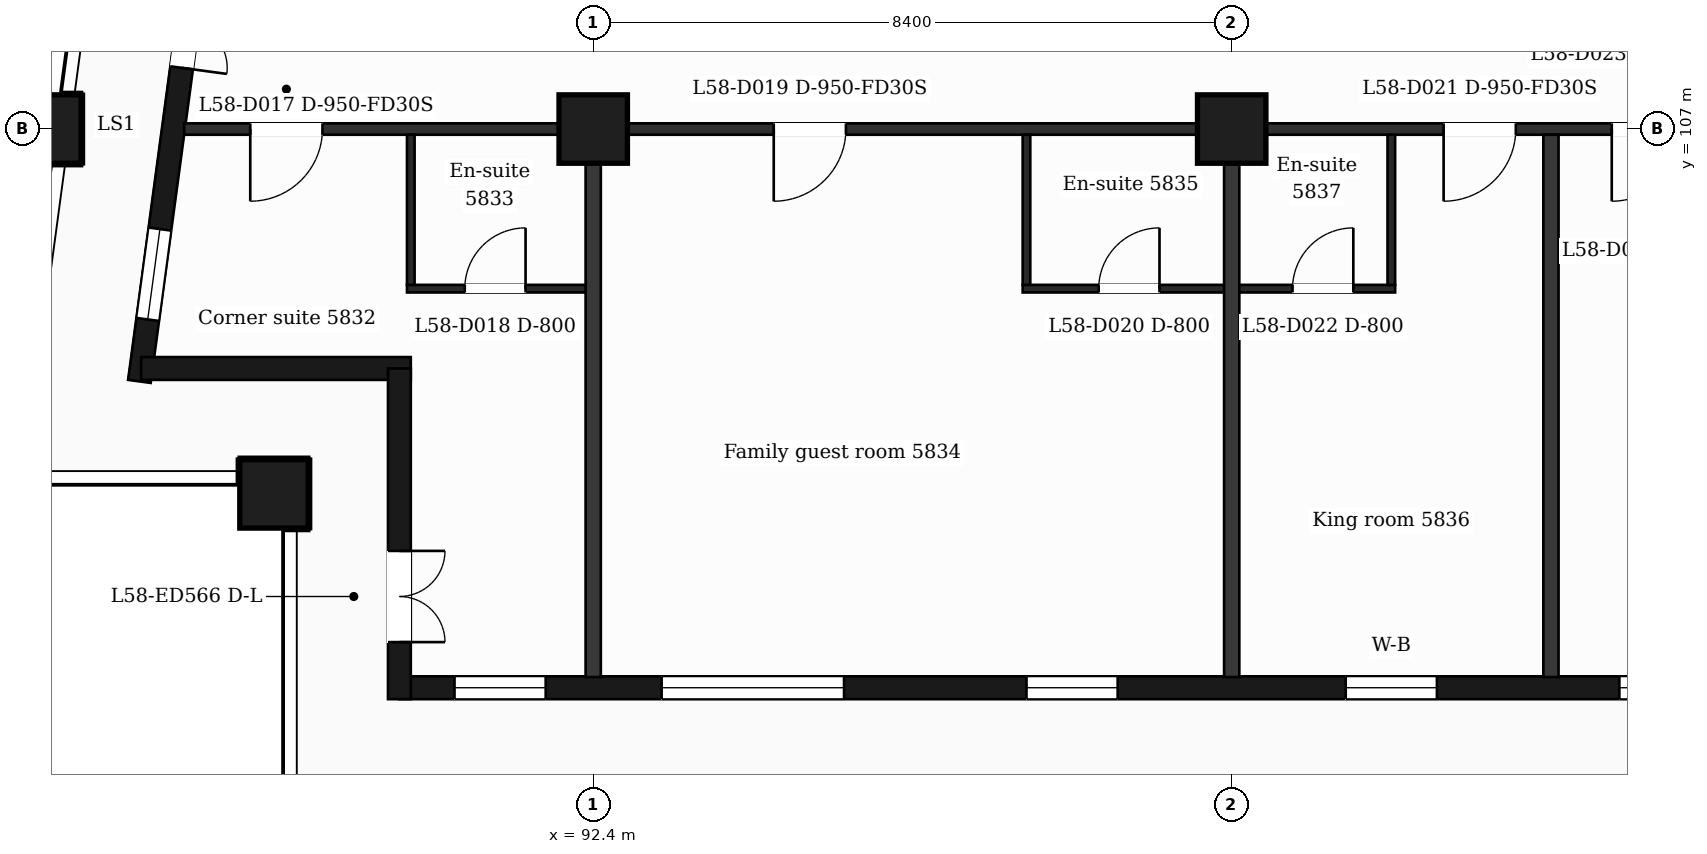
"""IFC4 building model, lengths in metres.
Left out: names, types, materials, properties, quantities, classifications, styles, units other than length and angle.
Written with IfcOpenShell. Run it as: python <this file> out.ifc"""

import sys

from ifc_helpers import new_model, si_unit, direction, frame, frame_2d, origin, origin_2d, place, context, subcontext, project, spatial, rectangle, extrude, element, fill, save


model = new_model("IFC4")
c1 = context("Model", 3, precision=1e-05, world=origin(), true_north=direction((0.0, 1.0)))
c2 = subcontext(c1, "Body", "Model", "MODEL_VIEW")
j1 = project(units=[si_unit("LENGTHUNIT", "METRE"), si_unit("PLANEANGLEUNIT", "RADIAN")], contexts=[c1])
p1 = place(None, origin())
s1 = spatial("IfcSite", under=j1, at=p1, CompositionType="ELEMENT")
p2 = place(p1, origin())
s2 = spatial("IfcBuilding", under=s1, at=p2, CompositionType="ELEMENT")
p3 = place(p2, frame((0.0, 0.0, 239.2)))
s3 = spatial("IfcBuildingStorey", under=s2, at=p3, CompositionType="ELEMENT", Elevation=239.2)
for number, where, z_axis, x_axis in (
    (1, (88.2, 102.2, 0.0), (0.0, 0.0, 1.0), (1.0, 0.0, 0.0)),
    (2, (92.4, 107.0, 0.0), (0.0, 0.0, 1.0), (1.0, 0.0, 0.0)),
    (3, (100.8, 107.0, 0.0), (0.0, 0.0, 1.0), (1.0, 0.0, 0.0)),
    (4, (85.211, 107.0, 0.0), (0.0, 0.0, 1.0), (1.0, 0.0, 0.0)),
):
    element("IfcColumn", number, at=place(p3, frame(where, z_axis=z_axis, x_axis=x_axis)), inside=s3, PredefinedType="COLUMN", context=c2, shape_type="SweptSolid", body=[
        extrude(rectangle(XDim=0.9, YDim=0.9, at=origin_2d()), origin(), (0.0, 0.0, 1.0), 3.7),
    ])
p4 = place(p3, frame((89.85, 99.65, 0.0), z_axis=(0.0, 0.0, 1.0), x_axis=(1.0, 0.0, 0.0)))
e5 = element("IfcWall", 5, at=p4, inside=s3, PredefinedType="SOLIDWALL", context=c2, shape_type="SweptSolid", body=[
    extrude(rectangle(XDim=47.25, YDim=0.3, at=frame_2d((23.625, 0.0))), origin(), (0.0, 0.0, 1.0), 3.38),
])
p5 = place(p4, frame((0.725, 0.0, 0.9)))
e6 = element("IfcOpeningElement", 6, at=p5, cuts=e5, PredefinedType="OPENING", context=c2, shape_type="SweptSolid", body=[
    extrude(rectangle(XDim=1.2, YDim=2.1, at=frame_2d((0.6, 1.05))), frame((0.0, 0.16, 0.0), z_axis=(0.0, -1.0, 0.0), x_axis=(1.0, 0.0, 0.0)), (0.0, 0.0, 1.0), 0.32),
])
p6 = place(p4, frame((3.45, 0.0, 0.9)))
e7 = element("IfcOpeningElement", 7, at=p6, cuts=e5, PredefinedType="OPENING", context=c2, shape_type="SweptSolid", body=[
    extrude(rectangle(XDim=2.4, YDim=2.1, at=frame_2d((1.2, 1.05))), frame((0.0, 0.16, 0.0), z_axis=(0.0, -1.0, 0.0), x_axis=(1.0, 0.0, 0.0)), (0.0, 0.0, 1.0), 0.32),
])
p7 = place(p4, frame((8.25, 0.0, 0.9)))
e8 = element("IfcOpeningElement", 8, at=p7, cuts=e5, PredefinedType="OPENING", context=c2, shape_type="SweptSolid", body=[
    extrude(rectangle(XDim=1.2, YDim=2.1, at=frame_2d((0.6, 1.05))), frame((0.0, 0.16, 0.0), z_axis=(0.0, -1.0, 0.0), x_axis=(1.0, 0.0, 0.0)), (0.0, 0.0, 1.0), 0.32),
])
p8 = place(p4, frame((12.45, 0.0, 0.9)))
e9 = element("IfcOpeningElement", 9, at=p8, cuts=e5, PredefinedType="OPENING", context=c2, shape_type="SweptSolid", body=[
    extrude(rectangle(XDim=1.2, YDim=2.1, at=frame_2d((0.6, 1.05))), frame((0.0, 0.16, 0.0), z_axis=(0.0, -1.0, 0.0), x_axis=(1.0, 0.0, 0.0)), (0.0, 0.0, 1.0), 0.32),
])
p9 = place(p4, frame((16.05, 0.0, 0.9)))
e10 = element("IfcOpeningElement", 10, at=p9, cuts=e5, PredefinedType="OPENING", context=c2, shape_type="SweptSolid", body=[
    extrude(rectangle(XDim=2.4, YDim=2.1, at=frame_2d((1.2, 1.05))), frame((0.0, 0.16, 0.0), z_axis=(0.0, -1.0, 0.0), x_axis=(1.0, 0.0, 0.0)), (0.0, 0.0, 1.0), 0.32),
])
p10 = place(p4, frame((20.25, 0.0, 0.9)))
e11 = element("IfcOpeningElement", 11, at=p10, cuts=e5, PredefinedType="OPENING", context=c2, shape_type="SweptSolid", body=[
    extrude(rectangle(XDim=2.4, YDim=2.1, at=frame_2d((1.2, 1.05))), frame((0.0, 0.16, 0.0), z_axis=(0.0, -1.0, 0.0), x_axis=(1.0, 0.0, 0.0)), (0.0, 0.0, 1.0), 0.32),
])
p11 = place(p4, frame((25.05, 0.0, 0.0)))
e12 = element("IfcOpeningElement", 12, at=p11, cuts=e5, PredefinedType="OPENING", context=c2, shape_type="SweptSolid", body=[
    extrude(rectangle(XDim=1.2, YDim=2.4, at=frame_2d((0.6, 1.2))), frame((0.0, 0.16, 0.0), z_axis=(0.0, -1.0, 0.0), x_axis=(1.0, 0.0, 0.0)), (0.0, 0.0, 1.0), 0.32),
])
p12 = place(p4, frame((28.65, 0.0, 0.9)))
e13 = element("IfcOpeningElement", 13, at=p12, cuts=e5, PredefinedType="OPENING", context=c2, shape_type="SweptSolid", body=[
    extrude(rectangle(XDim=2.4, YDim=2.1, at=frame_2d((1.2, 1.05))), frame((0.0, 0.16, 0.0), z_axis=(0.0, -1.0, 0.0), x_axis=(1.0, 0.0, 0.0)), (0.0, 0.0, 1.0), 0.32),
])
p13 = place(p4, frame((32.85, 0.0, 0.9)))
e14 = element("IfcOpeningElement", 14, at=p13, cuts=e5, PredefinedType="OPENING", context=c2, shape_type="SweptSolid", body=[
    extrude(rectangle(XDim=2.4, YDim=2.1, at=frame_2d((1.2, 1.05))), frame((0.0, 0.16, 0.0), z_axis=(0.0, -1.0, 0.0), x_axis=(1.0, 0.0, 0.0)), (0.0, 0.0, 1.0), 0.32),
])
p14 = place(p4, frame((37.65, 0.0, 0.9)))
e15 = element("IfcOpeningElement", 15, at=p14, cuts=e5, PredefinedType="OPENING", context=c2, shape_type="SweptSolid", body=[
    extrude(rectangle(XDim=1.2, YDim=2.1, at=frame_2d((0.6, 1.05))), frame((0.0, 0.16, 0.0), z_axis=(0.0, -1.0, 0.0), x_axis=(1.0, 0.0, 0.0)), (0.0, 0.0, 1.0), 0.32),
])
p15 = place(p4, frame((41.85, 0.0, 0.9)))
e16 = element("IfcOpeningElement", 16, at=p15, cuts=e5, PredefinedType="OPENING", context=c2, shape_type="SweptSolid", body=[
    extrude(rectangle(XDim=1.2, YDim=2.1, at=frame_2d((0.6, 1.05))), frame((0.0, 0.16, 0.0), z_axis=(0.0, -1.0, 0.0), x_axis=(1.0, 0.0, 0.0)), (0.0, 0.0, 1.0), 0.32),
])
p16 = place(p4, frame((45.25, 0.0, 0.9)))
e17 = element("IfcOpeningElement", 17, at=p16, cuts=e5, PredefinedType="OPENING", context=c2, shape_type="SweptSolid", body=[
    extrude(rectangle(XDim=1.2, YDim=2.1, at=frame_2d((0.6, 1.05))), frame((0.0, 0.16, 0.0), z_axis=(0.0, -1.0, 0.0), x_axis=(1.0, 0.0, 0.0)), (0.0, 0.0, 1.0), 0.32),
])
p17 = place(p3, frame((87.334, 110.4, 0.0), z_axis=(0.0, 0.0, 1.0), x_axis=(-0.133437175554, -0.991057273915, 0.0)))
e18 = element("IfcWall", 18, at=p17, inside=s3, PredefinedType="SOLIDWALL", context=c2, shape_type="SweptSolid", body=[
    extrude(rectangle(XDim=6.781, YDim=0.3, at=frame_2d((3.39, 0.0))), origin(), (0.0, 0.0, 1.0), 3.38),
])
p18 = place(p17, frame((1.418, 0.0, 0.0)))
e19 = element("IfcOpeningElement", 19, at=p18, cuts=e18, PredefinedType="OPENING", context=c2, shape_type="SweptSolid", body=[
    extrude(rectangle(XDim=1.2, YDim=2.4, at=frame_2d((0.6, 1.2))), frame((0.0, 0.16, 0.0), z_axis=(0.0, -1.0, 0.0), x_axis=(1.0, 0.0, 0.0)), (0.0, 0.0, 1.0), 0.32),
])
p19 = place(p17, frame((4.758, 0.0, 0.9)))
e20 = element("IfcOpeningElement", 20, at=p19, cuts=e18, PredefinedType="OPENING", context=c2, shape_type="SweptSolid", body=[
    extrude(rectangle(XDim=1.2, YDim=2.1, at=frame_2d((0.6, 1.05))), frame((0.0, 0.16, 0.0), z_axis=(0.0, -1.0, 0.0), x_axis=(1.0, 0.0, 0.0)), (0.0, 0.0, 1.0), 0.32),
])
p20 = place(p3, frame((86.452, 103.85, 0.0), z_axis=(0.0, 0.0, 1.0), x_axis=(1.0, 0.0, 0.0)))
e21 = element("IfcWall", 21, at=p20, inside=s3, PredefinedType="SOLIDWALL", context=c2, shape_type="SweptSolid", body=[
    extrude(rectangle(XDim=3.548, YDim=0.3, at=frame_2d((1.774, 0.0))), origin(), (0.0, 0.0, 1.0), 3.38),
])
p21 = place(p3, frame((89.85, 103.85, 0.0), z_axis=(0.0, 0.0, 1.0), x_axis=(0.0, -1.0, 0.0)))
e22 = element("IfcWall", 22, at=p21, inside=s3, PredefinedType="SOLIDWALL", context=c2, shape_type="SweptSolid", body=[
    extrude(rectangle(XDim=4.35, YDim=0.3, at=frame_2d((2.175, 0.0))), origin(), (0.0, 0.0, 1.0), 3.38),
])
p22 = place(p21, frame((2.4, 0.0, 0.0)))
e23 = element("IfcOpeningElement", 23, at=p22, cuts=e22, PredefinedType="OPENING", context=c2, shape_type="SweptSolid", body=[
    extrude(rectangle(XDim=1.2, YDim=2.4, at=frame_2d((0.6, 1.2))), frame((0.0, 0.16, 0.0), z_axis=(0.0, -1.0, 0.0), x_axis=(1.0, 0.0, 0.0)), (0.0, 0.0, 1.0), 0.32),
])
p23 = place(p3, frame((89.95, 104.9, 0.0), z_axis=(0.0, 0.0, 1.0), x_axis=(1.0, 0.0, 0.0)))
e24 = element("IfcWall", 24, at=p23, inside=s3, PredefinedType="PARTITIONING", context=c2, shape_type="SweptSolid", body=[
    extrude(rectangle(XDim=2.45, YDim=0.1, at=frame_2d((1.225, 0.0))), origin(), (0.0, 0.0, 1.0), 3.38),
])
p24 = place(p23, frame((0.76, 0.0, 0.0)))
e25 = element("IfcOpeningElement", 25, at=p24, cuts=e24, PredefinedType="OPENING", context=c2, shape_type="SweptSolid", body=[
    extrude(rectangle(XDim=0.8, YDim=2.1, at=frame_2d((0.4, 1.05))), frame((0.0, 0.06, 0.0), z_axis=(0.0, -1.0, 0.0), x_axis=(1.0, 0.0, 0.0)), (0.0, 0.0, 1.0), 0.12),
])
p25 = place(p3, frame((98.05, 104.9, 0.0), z_axis=(0.0, 0.0, 1.0), x_axis=(1.0, 0.0, 0.0)))
e26 = element("IfcWall", 26, at=p25, inside=s3, PredefinedType="PARTITIONING", context=c2, shape_type="SweptSolid", body=[
    extrude(rectangle(XDim=4.9, YDim=0.1, at=frame_2d((2.45, 0.0))), origin(), (0.0, 0.0, 1.0), 3.38),
])
p26 = place(p25, frame((1.0, 0.0, 0.0)))
e27 = element("IfcOpeningElement", 27, at=p26, cuts=e26, PredefinedType="OPENING", context=c2, shape_type="SweptSolid", body=[
    extrude(rectangle(XDim=0.8, YDim=2.1, at=frame_2d((0.4, 1.05))), frame((0.0, 0.06, 0.0), z_axis=(0.0, -1.0, 0.0), x_axis=(1.0, 0.0, 0.0)), (0.0, 0.0, 1.0), 0.12),
])
p27 = place(p25, frame((3.55, 0.0, 0.0)))
e28 = element("IfcOpeningElement", 28, at=p27, cuts=e26, PredefinedType="OPENING", context=c2, shape_type="SweptSolid", body=[
    extrude(rectangle(XDim=0.8, YDim=2.1, at=frame_2d((0.4, 1.05))), frame((0.0, 0.06, 0.0), z_axis=(0.0, -1.0, 0.0), x_axis=(1.0, 0.0, 0.0)), (0.0, 0.0, 1.0), 0.12),
])
p28 = place(p3, frame((87.018, 107.0, 0.0), z_axis=(0.0, 0.0, 1.0), x_axis=(1.0, 0.0, 0.0)))
e29 = element("IfcWall", 29, at=p28, inside=s3, PredefinedType="PARTITIONING", context=c2, shape_type="SweptSolid", body=[
    extrude(rectangle(XDim=52.765, YDim=0.15, at=frame_2d((26.382, 0.0))), origin(), (0.0, 0.0, 1.0), 3.38),
])
p29 = place(p28, frame((0.87, 0.0, 0.0)))
e30 = element("IfcOpeningElement", 30, at=p29, cuts=e29, PredefinedType="OPENING", context=c2, shape_type="SweptSolid", body=[
    extrude(rectangle(XDim=0.95, YDim=2.1, at=frame_2d((0.475, 1.05))), frame((0.0, 0.085, 0.0), z_axis=(0.0, -1.0, 0.0), x_axis=(1.0, 0.0, 0.0)), (0.0, 0.0, 1.0), 0.17),
])
p30 = place(p28, frame((7.757, 0.0, 0.0)))
e31 = element("IfcOpeningElement", 31, at=p30, cuts=e29, PredefinedType="OPENING", context=c2, shape_type="SweptSolid", body=[
    extrude(rectangle(XDim=0.95, YDim=2.1, at=frame_2d((0.475, 1.05))), frame((0.0, 0.085, 0.0), z_axis=(0.0, -1.0, 0.0), x_axis=(1.0, 0.0, 0.0)), (0.0, 0.0, 1.0), 0.17),
])
p31 = place(p28, frame((16.57, 0.0, 0.0)))
e32 = element("IfcOpeningElement", 32, at=p31, cuts=e29, PredefinedType="OPENING", context=c2, shape_type="SweptSolid", body=[
    extrude(rectangle(XDim=0.95, YDim=2.1, at=frame_2d((0.475, 1.05))), frame((0.0, 0.085, 0.0), z_axis=(0.0, -1.0, 0.0), x_axis=(1.0, 0.0, 0.0)), (0.0, 0.0, 1.0), 0.17),
])
p32 = place(p28, frame((18.782, 0.0, 0.0)))
e33 = element("IfcOpeningElement", 33, at=p32, cuts=e29, PredefinedType="OPENING", context=c2, shape_type="SweptSolid", body=[
    extrude(rectangle(XDim=0.95, YDim=2.1, at=frame_2d((0.475, 1.05))), frame((0.0, 0.085, 0.0), z_axis=(0.0, -1.0, 0.0), x_axis=(1.0, 0.0, 0.0)), (0.0, 0.0, 1.0), 0.17),
])
p33 = place(p28, frame((24.519, 0.0, 0.0)))
e34 = element("IfcOpeningElement", 34, at=p33, cuts=e29, PredefinedType="OPENING", context=c2, shape_type="SweptSolid", body=[
    extrude(rectangle(XDim=0.95, YDim=2.1, at=frame_2d((0.475, 1.05))), frame((0.0, 0.085, 0.0), z_axis=(0.0, -1.0, 0.0), x_axis=(1.0, 0.0, 0.0)), (0.0, 0.0, 1.0), 0.17),
])
p34 = place(p28, frame((26.919, 0.0, 0.0)))
e35 = element("IfcOpeningElement", 35, at=p34, cuts=e29, PredefinedType="OPENING", context=c2, shape_type="SweptSolid", body=[
    extrude(rectangle(XDim=0.95, YDim=2.1, at=frame_2d((0.475, 1.05))), frame((0.0, 0.085, 0.0), z_axis=(0.0, -1.0, 0.0), x_axis=(1.0, 0.0, 0.0)), (0.0, 0.0, 1.0), 0.17),
])
p35 = place(p28, frame((33.557, 0.0, 0.0)))
e36 = element("IfcOpeningElement", 36, at=p35, cuts=e29, PredefinedType="OPENING", context=c2, shape_type="SweptSolid", body=[
    extrude(rectangle(XDim=0.95, YDim=2.1, at=frame_2d((0.475, 1.05))), frame((0.0, 0.085, 0.0), z_axis=(0.0, -1.0, 0.0), x_axis=(1.0, 0.0, 0.0)), (0.0, 0.0, 1.0), 0.17),
])
p36 = place(p28, frame((40.157, 0.0, 0.0)))
e37 = element("IfcOpeningElement", 37, at=p36, cuts=e29, PredefinedType="OPENING", context=c2, shape_type="SweptSolid", body=[
    extrude(rectangle(XDim=1.0, YDim=2.1, at=frame_2d((0.5, 1.05))), frame((0.0, 0.085, 0.0), z_axis=(0.0, -1.0, 0.0), x_axis=(1.0, 0.0, 0.0)), (0.0, 0.0, 1.0), 0.17),
])
p37 = place(p28, frame((48.767, 0.0, 0.0)))
e38 = element("IfcOpeningElement", 38, at=p37, cuts=e29, PredefinedType="OPENING", context=c2, shape_type="SweptSolid", body=[
    extrude(rectangle(XDim=0.95, YDim=2.1, at=frame_2d((0.475, 1.05))), frame((0.0, 0.085, 0.0), z_axis=(0.0, -1.0, 0.0), x_axis=(1.0, 0.0, 0.0)), (0.0, 0.0, 1.0), 0.17),
])
p38 = place(p3, frame((90.0, 104.95, 0.0), z_axis=(0.0, 0.0, 1.0), x_axis=(0.0, 1.0, 0.0)))
e39 = element("IfcWall", 39, at=p38, inside=s3, PredefinedType="PARTITIONING", context=c2, shape_type="SweptSolid", body=[
    extrude(rectangle(XDim=1.975, YDim=0.1, at=frame_2d((0.988, 0.0))), origin(), (0.0, 0.0, 1.0), 3.38),
])
p39 = place(p3, frame((92.4, 99.79, 0.0), z_axis=(0.0, 0.0, 1.0), x_axis=(0.0, 1.0, 0.0)))
e40 = element("IfcWall", 40, at=p39, inside=s3, PredefinedType="PARTITIONING", context=c2, shape_type="SweptSolid", body=[
    extrude(rectangle(XDim=7.135, YDim=0.2, at=frame_2d((3.567, 0.0))), origin(), (0.0, 0.0, 1.0), 3.38),
])
p40 = place(p3, frame((98.1, 104.95, 0.0), z_axis=(0.0, 0.0, 1.0), x_axis=(0.0, 1.0, 0.0)))
e41 = element("IfcWall", 41, at=p40, inside=s3, PredefinedType="PARTITIONING", context=c2, shape_type="SweptSolid", body=[
    extrude(rectangle(XDim=1.975, YDim=0.1, at=frame_2d((0.988, 0.0))), origin(), (0.0, 0.0, 1.0), 3.38),
])
p41 = place(p3, frame((100.8, 99.79, 0.0), z_axis=(0.0, 0.0, 1.0), x_axis=(0.0, 1.0, 0.0)))
e42 = element("IfcWall", 42, at=p41, inside=s3, PredefinedType="PARTITIONING", context=c2, shape_type="SweptSolid", body=[
    extrude(rectangle(XDim=7.135, YDim=0.2, at=frame_2d((3.567, 0.0))), origin(), (0.0, 0.0, 1.0), 3.38),
])
p42 = place(p3, frame((102.9, 104.95, 0.0), z_axis=(0.0, 0.0, 1.0), x_axis=(0.0, 1.0, 0.0)))
e43 = element("IfcWall", 43, at=p42, inside=s3, PredefinedType="PARTITIONING", context=c2, shape_type="SweptSolid", body=[
    extrude(rectangle(XDim=1.975, YDim=0.1, at=frame_2d((0.988, 0.0))), origin(), (0.0, 0.0, 1.0), 3.38),
])
p43 = place(p3, frame((105.0, 99.79, 0.0), z_axis=(0.0, 0.0, 1.0), x_axis=(0.0, 1.0, 0.0)))
e44 = element("IfcWall", 44, at=p43, inside=s3, PredefinedType="PARTITIONING", context=c2, shape_type="SweptSolid", body=[
    extrude(rectangle(XDim=7.135, YDim=0.2, at=frame_2d((3.567, 0.0))), origin(), (0.0, 0.0, 1.0), 3.38),
])
p44 = place(p5, origin())
e45 = element("IfcWindow", 45, at=p44, inside=s3, PartitioningType="SINGLE_PANEL", PredefinedType="WINDOW", context=c2, shape_type="SweptSolid", body=[
    extrude(rectangle(XDim=1.2, YDim=2.1, at=frame_2d((0.6, 1.05))), frame((0.0, 0.03, 0.0), z_axis=(0.0, -1.0, 0.0), x_axis=(1.0, 0.0, 0.0)), (0.0, 0.0, 1.0), 0.06),
])
fill(e6, e45)
p45 = place(p6, origin())
e46 = element("IfcWindow", 46, at=p45, inside=s3, PartitioningType="SINGLE_PANEL", PredefinedType="WINDOW", context=c2, shape_type="SweptSolid", body=[
    extrude(rectangle(XDim=2.4, YDim=2.1, at=frame_2d((1.2, 1.05))), frame((0.0, 0.03, 0.0), z_axis=(0.0, -1.0, 0.0), x_axis=(1.0, 0.0, 0.0)), (0.0, 0.0, 1.0), 0.06),
])
fill(e7, e46)
p46 = place(p7, origin())
e47 = element("IfcWindow", 47, at=p46, inside=s3, PartitioningType="SINGLE_PANEL", PredefinedType="WINDOW", context=c2, shape_type="SweptSolid", body=[
    extrude(rectangle(XDim=1.2, YDim=2.1, at=frame_2d((0.6, 1.05))), frame((0.0, 0.03, 0.0), z_axis=(0.0, -1.0, 0.0), x_axis=(1.0, 0.0, 0.0)), (0.0, 0.0, 1.0), 0.06),
])
fill(e8, e47)
p47 = place(p8, origin())
e48 = element("IfcWindow", 48, at=p47, inside=s3, PartitioningType="SINGLE_PANEL", PredefinedType="WINDOW", context=c2, shape_type="SweptSolid", body=[
    extrude(rectangle(XDim=1.2, YDim=2.1, at=frame_2d((0.6, 1.05))), frame((0.0, 0.03, 0.0), z_axis=(0.0, -1.0, 0.0), x_axis=(1.0, 0.0, 0.0)), (0.0, 0.0, 1.0), 0.06),
])
fill(e9, e48)
p48 = place(p9, origin())
e49 = element("IfcWindow", 49, at=p48, inside=s3, PartitioningType="SINGLE_PANEL", PredefinedType="WINDOW", context=c2, shape_type="SweptSolid", body=[
    extrude(rectangle(XDim=2.4, YDim=2.1, at=frame_2d((1.2, 1.05))), frame((0.0, 0.03, 0.0), z_axis=(0.0, -1.0, 0.0), x_axis=(1.0, 0.0, 0.0)), (0.0, 0.0, 1.0), 0.06),
])
fill(e10, e49)
p49 = place(p18, origin())
e50 = element("IfcDoor", 50, at=p49, inside=s3, OperationType="DOUBLE_DOOR_SINGLE_SWING", PredefinedType="DOOR", context=c2, shape_type="SweptSolid", body=[
    extrude(rectangle(XDim=1.2, YDim=2.4, at=frame_2d((0.6, 1.2))), frame((0.0, 0.025, 0.0), z_axis=(0.0, -1.0, 0.0), x_axis=(1.0, 0.0, 0.0)), (0.0, 0.0, 1.0), 0.05),
])
fill(e19, e50)
p50 = place(p19, origin())
e51 = element("IfcWindow", 51, at=p50, inside=s3, PartitioningType="SINGLE_PANEL", PredefinedType="WINDOW", context=c2, shape_type="SweptSolid", body=[
    extrude(rectangle(XDim=1.2, YDim=2.1, at=frame_2d((0.6, 1.05))), frame((0.0, 0.03, 0.0), z_axis=(0.0, -1.0, 0.0), x_axis=(1.0, 0.0, 0.0)), (0.0, 0.0, 1.0), 0.06),
])
fill(e20, e51)
p51 = place(p22, origin())
e52 = element("IfcDoor", 52, at=p51, inside=s3, OperationType="DOUBLE_DOOR_SINGLE_SWING", PredefinedType="DOOR", context=c2, shape_type="SweptSolid", body=[
    extrude(rectangle(XDim=1.2, YDim=2.4, at=frame_2d((0.6, 1.2))), frame((0.0, 0.025, 0.0), z_axis=(0.0, -1.0, 0.0), x_axis=(1.0, 0.0, 0.0)), (0.0, 0.0, 1.0), 0.05),
])
fill(e23, e52)
p52 = place(p29, origin())
e53 = element("IfcDoor", 53, at=p52, inside=s3, OperationType="SINGLE_SWING_LEFT", PredefinedType="DOOR", context=c2, shape_type="SweptSolid", body=[
    extrude(rectangle(XDim=0.95, YDim=2.1, at=frame_2d((0.475, 1.05))), frame((0.0, 0.025, 0.0), z_axis=(0.0, -1.0, 0.0), x_axis=(1.0, 0.0, 0.0)), (0.0, 0.0, 1.0), 0.05),
])
fill(e30, e53)
p53 = place(p24, origin())
e54 = element("IfcDoor", 54, at=p53, inside=s3, OperationType="SINGLE_SWING_RIGHT", PredefinedType="DOOR", context=c2, shape_type="SweptSolid", body=[
    extrude(rectangle(XDim=0.8, YDim=2.1, at=frame_2d((0.4, 1.05))), frame((0.0, 0.025, 0.0), z_axis=(0.0, -1.0, 0.0), x_axis=(1.0, 0.0, 0.0)), (0.0, 0.0, 1.0), 0.05),
])
fill(e25, e54)
p54 = place(p30, origin())
e55 = element("IfcDoor", 55, at=p54, inside=s3, OperationType="SINGLE_SWING_LEFT", PredefinedType="DOOR", context=c2, shape_type="SweptSolid", body=[
    extrude(rectangle(XDim=0.95, YDim=2.1, at=frame_2d((0.475, 1.05))), frame((0.0, 0.025, 0.0), z_axis=(0.0, -1.0, 0.0), x_axis=(1.0, 0.0, 0.0)), (0.0, 0.0, 1.0), 0.05),
])
fill(e31, e55)
p55 = place(p26, origin())
e56 = element("IfcDoor", 56, at=p55, inside=s3, OperationType="SINGLE_SWING_RIGHT", PredefinedType="DOOR", context=c2, shape_type="SweptSolid", body=[
    extrude(rectangle(XDim=0.8, YDim=2.1, at=frame_2d((0.4, 1.05))), frame((0.0, 0.025, 0.0), z_axis=(0.0, -1.0, 0.0), x_axis=(1.0, 0.0, 0.0)), (0.0, 0.0, 1.0), 0.05),
])
fill(e27, e56)
p56 = place(p31, origin())
e57 = element("IfcDoor", 57, at=p56, inside=s3, OperationType="SINGLE_SWING_LEFT", PredefinedType="DOOR", context=c2, shape_type="SweptSolid", body=[
    extrude(rectangle(XDim=0.95, YDim=2.1, at=frame_2d((0.475, 1.05))), frame((0.0, 0.025, 0.0), z_axis=(0.0, -1.0, 0.0), x_axis=(1.0, 0.0, 0.0)), (0.0, 0.0, 1.0), 0.05),
])
fill(e32, e57)
p57 = place(p27, origin())
e58 = element("IfcDoor", 58, at=p57, inside=s3, OperationType="SINGLE_SWING_RIGHT", PredefinedType="DOOR", context=c2, shape_type="SweptSolid", body=[
    extrude(rectangle(XDim=0.8, YDim=2.1, at=frame_2d((0.4, 1.05))), frame((0.0, 0.025, 0.0), z_axis=(0.0, -1.0, 0.0), x_axis=(1.0, 0.0, 0.0)), (0.0, 0.0, 1.0), 0.05),
])
fill(e28, e58)
p58 = place(p32, origin())
e59 = element("IfcDoor", 59, at=p58, inside=s3, OperationType="SINGLE_SWING_LEFT", PredefinedType="DOOR", context=c2, shape_type="SweptSolid", body=[
    extrude(rectangle(XDim=0.95, YDim=2.1, at=frame_2d((0.475, 1.05))), frame((0.0, 0.025, 0.0), z_axis=(0.0, -1.0, 0.0), x_axis=(1.0, 0.0, 0.0)), (0.0, 0.0, 1.0), 0.05),
])
fill(e33, e59)
save(model, sys.argv[1])
